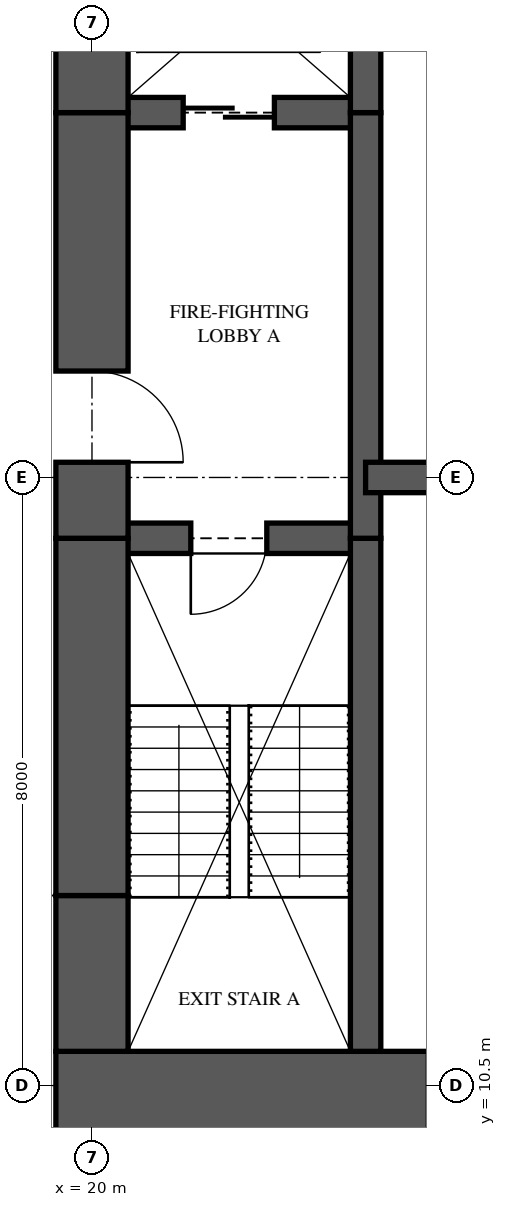
"""IFC4 building model, lengths in metres.
Left out: names, types, materials, properties, quantities, classifications, styles, units other than length and angle.
Written with IfcOpenShell. Run it as: python <this file> out.ifc"""

import sys

from ifc_helpers import new_model, si_unit, direction, frame, frame_2d, origin, place, context, subcontext, project, spatial, rectangle, extrude, element, fill, save


model = new_model("IFC4")
c1 = context("Model", 3, precision=1e-05, world=origin(), true_north=direction((0.0, 1.0)))
c2 = subcontext(c1, "Body", "Model", "MODEL_VIEW")
j1 = project(units=[si_unit("LENGTHUNIT", "METRE"), si_unit("PLANEANGLEUNIT", "RADIAN")], contexts=[c1])
p1 = place(None, origin())
s1 = spatial("IfcSite", under=j1, at=p1, CompositionType="ELEMENT")
p2 = place(p1, origin())
s2 = spatial("IfcBuilding", under=s1, at=p2, CompositionType="ELEMENT")
p3 = place(p2, frame((0.0, 0.0, 57.85)))
s3 = spatial("IfcBuildingStorey", under=s2, at=p3, CompositionType="ELEMENT", Elevation=57.85)
p4 = place(p3, frame((19.525, 10.125, 0.0), z_axis=(0.0, 0.0, 1.0), x_axis=(1.0, 0.0, 0.0)))
e1 = element("IfcWall", 1, at=p4, inside=s3, PredefinedType="SHEAR", context=c2, shape_type="SweptSolid", body=[
    extrude(rectangle(XDim=6.475, YDim=1.65, at=frame_2d((3.238, 0.0))), origin(), (0.0, 0.0, 1.0), 3.35),
])
p5 = place(p4, frame((4.9, 0.0, 0.0)))
e2 = element("IfcOpeningElement", 2, at=p5, cuts=e1, PredefinedType="OPENING", context=c2, shape_type="SweptSolid", body=[
    extrude(rectangle(XDim=0.75, YDim=2.1, at=frame_2d((0.375, 1.05))), frame((0.0, 0.835, 0.0), z_axis=(0.0, -1.0, 0.0), x_axis=(1.0, 0.0, 0.0)), (0.0, 0.0, 1.0), 1.67),
])
p6 = place(p3, frame((20.0, 26.05, 0.0), z_axis=(0.0, 0.0, 1.0), x_axis=(0.0, -1.0, 0.0)))
e3 = element("IfcWall", 3, at=p6, inside=s3, PredefinedType="SHEAR", context=c2, shape_type="SweptSolid", body=[
    extrude(rectangle(XDim=2.75, YDim=0.95, at=frame_2d((1.375, 0.0))), origin(), (0.0, 0.0, 1.0), 3.35),
])
p7 = place(p3, frame((20.0, 23.3, 0.0), z_axis=(0.0, 0.0, 1.0), x_axis=(0.0, -1.0, 0.0)))
e4 = element("IfcWall", 4, at=p7, inside=s3, PredefinedType="SHEAR", context=c2, shape_type="SweptSolid", body=[
    extrude(rectangle(XDim=5.6, YDim=0.95, at=frame_2d((2.8, 0.0))), origin(), (0.0, 0.0, 1.0), 3.35),
])
p8 = place(p7, frame((3.4, 0.0, 0.0)))
e5 = element("IfcOpeningElement", 5, at=p8, cuts=e4, PredefinedType="OPENING", context=c2, shape_type="SweptSolid", body=[
    extrude(rectangle(XDim=1.2, YDim=2.2, at=frame_2d((0.6, 1.1))), frame((0.0, 0.485, 0.0), z_axis=(0.0, -1.0, 0.0), x_axis=(1.0, 0.0, 0.0)), (0.0, 0.0, 1.0), 0.97),
])
p9 = place(p3, frame((20.0, 17.7, 0.0), z_axis=(0.0, 0.0, 1.0), x_axis=(0.0, -1.0, 0.0)))
e6 = element("IfcWall", 6, at=p9, inside=s3, PredefinedType="SHEAR", context=c2, shape_type="SweptSolid", body=[
    extrude(rectangle(XDim=4.7, YDim=0.95, at=frame_2d((2.35, 0.0))), origin(), (0.0, 0.0, 1.0), 3.35),
])
p10 = place(p3, frame((20.0, 13.0, 0.0), z_axis=(0.0, 0.0, 1.0), x_axis=(0.0, -1.0, 0.0)))
e7 = element("IfcWall", 7, at=p10, inside=s3, PredefinedType="SHEAR", context=c2, shape_type="SweptSolid", body=[
    extrude(rectangle(XDim=2.05, YDim=0.95, at=frame_2d((1.025, 0.0))), origin(), (0.0, 0.0, 1.0), 3.35),
])
p11 = place(p3, frame((23.6, 10.95, 0.0), z_axis=(0.0, 0.0, 1.0), x_axis=(0.0, 1.0, 0.0)))
e8 = element("IfcWall", 8, at=p11, inside=s3, PredefinedType="SHEAR", context=c2, shape_type="SweptSolid", body=[
    extrude(rectangle(XDim=6.75, YDim=0.4, at=frame_2d((3.375, 0.0))), origin(), (0.0, 0.0, 1.0), 3.35),
])
p12 = place(p3, frame((23.6, 17.7, 0.0), z_axis=(0.0, 0.0, 1.0), x_axis=(0.0, 1.0, 0.0)))
e9 = element("IfcWall", 9, at=p12, inside=s3, PredefinedType="SHEAR", context=c2, shape_type="SweptSolid", body=[
    extrude(rectangle(XDim=5.6, YDim=0.4, at=frame_2d((2.8, 0.0))), origin(), (0.0, 0.0, 1.0), 3.35),
])
p13 = place(p3, frame((23.6, 23.3, 0.0), z_axis=(0.0, 0.0, 1.0), x_axis=(0.0, 1.0, 0.0)))
e10 = element("IfcWall", 10, at=p13, inside=s3, PredefinedType="SHEAR", context=c2, shape_type="SweptSolid", body=[
    extrude(rectangle(XDim=2.75, YDim=0.4, at=frame_2d((1.375, 0.0))), origin(), (0.0, 0.0, 1.0), 3.35),
])
p14 = place(p3, frame((20.0, 17.7, 0.0), z_axis=(0.0, 0.0, 1.0), x_axis=(1.0, 0.0, 0.0)))
e11 = element("IfcWall", 11, at=p14, inside=s3, PredefinedType="SHEAR", context=c2, shape_type="SweptSolid", body=[
    extrude(rectangle(XDim=3.6, YDim=0.4, at=frame_2d((1.8, 0.0))), origin(), (0.0, 0.0, 1.0), 3.35),
])
p15 = place(p14, frame((1.3, 0.0, 0.0)))
e12 = element("IfcOpeningElement", 12, at=p15, cuts=e11, PredefinedType="OPENING", context=c2, shape_type="SweptSolid", body=[
    extrude(rectangle(XDim=1.0, YDim=2.1, at=frame_2d((0.5, 1.05))), frame((0.0, 0.21, 0.0), z_axis=(0.0, -1.0, 0.0), x_axis=(1.0, 0.0, 0.0)), (0.0, 0.0, 1.0), 0.42),
])
p16 = place(p3, frame((20.0, 23.3, 0.0), z_axis=(0.0, 0.0, 1.0), x_axis=(1.0, 0.0, 0.0)))
e13 = element("IfcWall", 13, at=p16, inside=s3, PredefinedType="SHEAR", context=c2, shape_type="SweptSolid", body=[
    extrude(rectangle(XDim=3.6, YDim=0.4, at=frame_2d((1.8, 0.0))), origin(), (0.0, 0.0, 1.0), 3.35),
])
p17 = place(p16, frame((1.2, 0.0, 0.0)))
e14 = element("IfcOpeningElement", 14, at=p17, cuts=e13, PredefinedType="OPENING", context=c2, shape_type="SweptSolid", body=[
    extrude(rectangle(XDim=1.2, YDim=2.1, at=frame_2d((0.6, 1.05))), frame((0.0, 0.21, 0.0), z_axis=(0.0, -1.0, 0.0), x_axis=(1.0, 0.0, 0.0)), (0.0, 0.0, 1.0), 0.42),
])
p18 = place(p3, frame((23.6, 18.5, 0.0), z_axis=(0.0, 0.0, 1.0), x_axis=(1.0, 0.0, 0.0)))
e15 = element("IfcWall", 15, at=p18, inside=s3, PredefinedType="SHEAR", context=c2, shape_type="SweptSolid", body=[
    extrude(rectangle(XDim=2.4, YDim=0.4, at=frame_2d((1.2, 0.0))), origin(), (0.0, 0.0, 1.0), 3.35),
])
p19 = place(p15, frame((1.0, 0.0, 0.0), z_axis=(0.0, 0.0, 1.0), x_axis=(-1.0, 0.0, 0.0)))
e16 = element("IfcDoor", 16, at=p19, inside=s3, OperationType="SINGLE_SWING_RIGHT", PredefinedType="DOOR", context=c2, shape_type="SweptSolid", body=[
    extrude(rectangle(XDim=1.0, YDim=2.1, at=frame_2d((0.5, 1.05))), frame((0.0, 0.025, 0.0), z_axis=(0.0, -1.0, 0.0), x_axis=(1.0, 0.0, 0.0)), (0.0, 0.0, 1.0), 0.05),
])
fill(e12, e16)
p20 = place(p8, origin())
e17 = element("IfcDoor", 17, at=p20, inside=s3, OperationType="SINGLE_SWING_RIGHT", PredefinedType="DOOR", context=c2, shape_type="SweptSolid", body=[
    extrude(rectangle(XDim=1.2, YDim=2.2, at=frame_2d((0.6, 1.1))), frame((0.0, 0.025, 0.0), z_axis=(0.0, -1.0, 0.0), x_axis=(1.0, 0.0, 0.0)), (0.0, 0.0, 1.0), 0.05),
])
fill(e5, e17)
p21 = place(p17, origin())
e18 = element("IfcDoor", 18, at=p21, inside=s3, OperationType="SLIDING_TO_LEFT", PredefinedType="DOOR", context=c2, shape_type="SweptSolid", body=[
    extrude(rectangle(XDim=1.2, YDim=2.1, at=frame_2d((0.6, 1.05))), frame((0.0, 0.025, 0.0), z_axis=(0.0, -1.0, 0.0), x_axis=(1.0, 0.0, 0.0)), (0.0, 0.0, 1.0), 0.05),
])
fill(e14, e18)
save(model, sys.argv[1])
